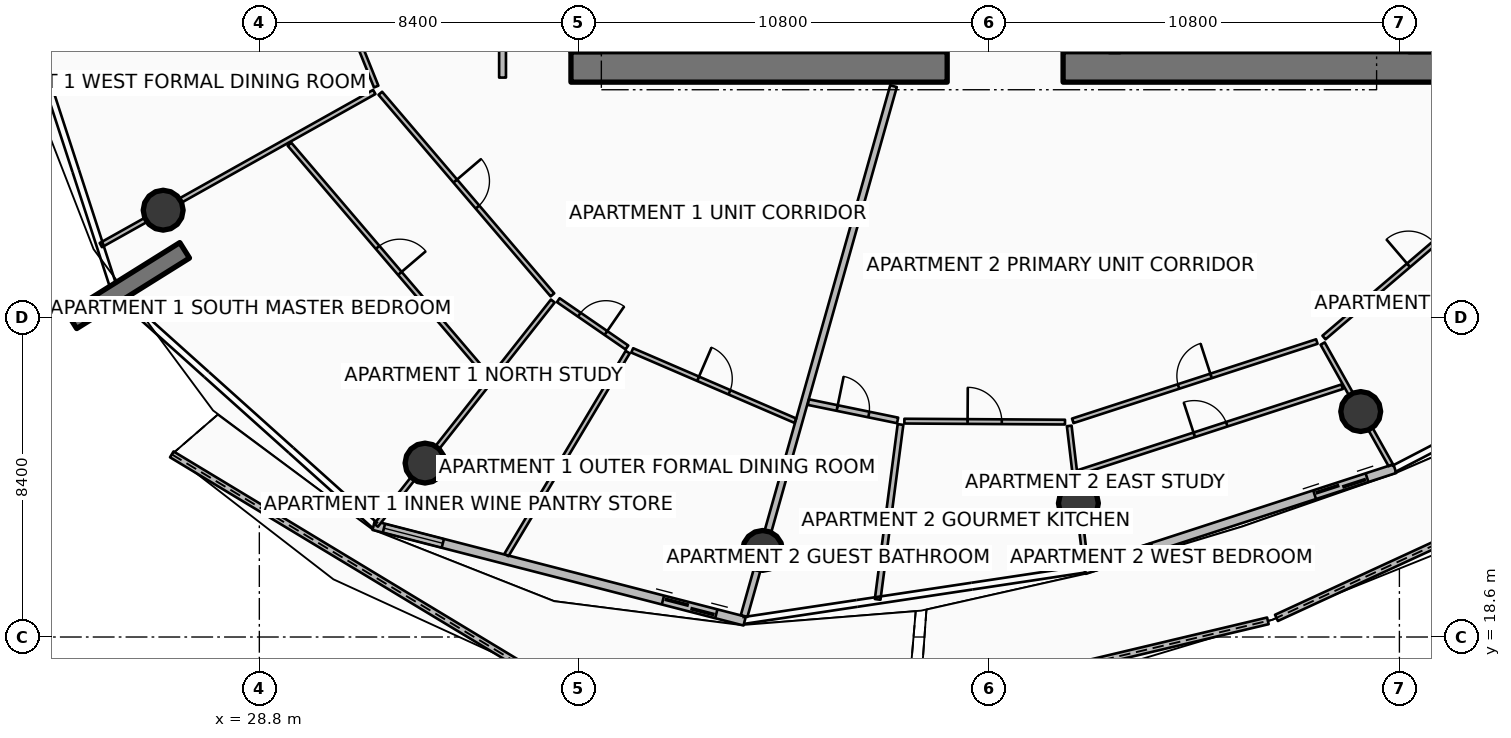
"""IFC4 building model, lengths in metres.
Left out: names, types, materials, properties, quantities, classifications, styles, units other than length and angle.
Written with IfcOpenShell. Run it as: python <this file> out.ifc"""

import sys

from ifc_helpers import new_model, si_unit, direction, frame, frame_2d, origin, origin_2d, place, context, subcontext, project, spatial, polyline, rectangle, circle, outline, extrude, element, fill, save


model = new_model("IFC4")
c1 = context("Model", 3, precision=1e-05, world=origin(), true_north=direction((0.0, 1.0)))
c2 = subcontext(c1, "Body", "Model", "MODEL_VIEW")
j1 = project(units=[si_unit("LENGTHUNIT", "METRE"), si_unit("PLANEANGLEUNIT", "RADIAN")], contexts=[c1])
p1 = place(None, origin())
s1 = spatial("IfcSite", under=j1, at=p1, CompositionType="ELEMENT")
p2 = place(p1, origin())
s2 = spatial("IfcBuilding", under=s1, at=p2, CompositionType="ELEMENT")
p3 = place(p2, frame((0.0, 0.0, 169.05)))
s3 = spatial("IfcBuildingStorey", under=s2, at=p3, CompositionType="ELEMENT", Elevation=169.05)
p4 = place(p3, frame((37.0, 33.6, 0.0), z_axis=(0.0, 0.0, 1.0), x_axis=(1.0, 0.0, 0.0)))
e1 = element("IfcWall", 1, at=p4, inside=s3, PredefinedType="SHEAR", context=c2, shape_type="SweptSolid", body=[
    extrude(rectangle(XDim=9.9, YDim=0.8, at=frame_2d((4.95, 0.0))), origin(), (0.0, 0.0, 1.0), 3.75),
])
p5 = place(p3, frame((49.95, 33.6, 0.0), z_axis=(0.0, 0.0, 1.0), x_axis=(1.0, 0.0, 0.0)))
e2 = element("IfcWall", 2, at=p5, inside=s3, PredefinedType="SHEAR", context=c2, shape_type="SweptSolid", body=[
    extrude(rectangle(XDim=9.9, YDim=0.8, at=frame_2d((4.95, 0.0))), origin(), (0.0, 0.0, 1.0), 3.75),
])
p6 = place(p3, frame((26.835, 28.774, 0.0), z_axis=(0.0, 0.0, 1.0), x_axis=(-0.848053161125, -0.529911158502, 0.0)))
e3 = element("IfcWall", 3, at=p6, inside=s3, PredefinedType="SOLIDWALL", context=c2, shape_type="SweptSolid", body=[
    extrude(rectangle(XDim=3.5, YDim=0.48, at=frame_2d((1.75, 0.0))), origin(), (0.0, 0.0, 1.0), 3.75),
])
for number, where, z_axis, x_axis in (
    (4, (26.27, 29.831, 0.0), (0.0, 0.0, 1.0), (1.0, 0.0, 0.0)),
    (5, (33.16, 23.176, 0.0), (0.0, 0.0, 1.0), (1.0, 0.0, 0.0)),
    (6, (42.043, 20.878, 0.0), (0.0, 0.0, 1.0), (1.0, 0.0, 0.0)),
    (7, (50.353, 22.119, 0.0), (0.0, 0.0, 1.0), (1.0, 0.0, 0.0)),
    (8, (57.782, 24.533, 0.0), (0.0, 0.0, 1.0), (1.0, 0.0, 0.0)),
):
    element("IfcColumn", number, at=place(p3, frame(where, z_axis=z_axis, x_axis=x_axis)), inside=s3, PredefinedType="COLUMN", context=c2, shape_type="SweptSolid", body=[
        extrude(circle(Radius=0.525, at=origin_2d()), origin(), (0.0, 0.0, 1.0), 3.5),
    ])
p7 = place(p3, frame((26.497, 23.406, 0.0), z_axis=(0.0, 0.0, 1.0), x_axis=(0.856001332464, -0.516973615207, 0.0)))
e9 = element("IfcWall", 9, at=p7, inside=s3, PredefinedType="PARAPET", context=c2, shape_type="SweptSolid", body=[
    extrude(outline(polyline([(0.0, 0.0), (10.626, 0.0), (10.626, 1.348), (5.313, 1.182), (0.0, 1.12), (0.0, 0.0)])), frame((0.0, 0.09, 0.0), z_axis=(0.0, -1.0, 0.0), x_axis=(1.0, 0.0, 0.0)), (0.0, 0.0, 1.0), 0.18),
])
p8 = place(p3, frame((46.175, 16.849, 0.0), z_axis=(0.0, 0.0, 1.0), x_axis=(0.972947039014, 0.231028265098, 0.0)))
e10 = element("IfcWall", 10, at=p8, inside=s3, PredefinedType="PARAPET", context=c2, shape_type="SweptSolid", body=[
    extrude(outline(polyline([(0.0, 0.0), (9.419, 0.0), (9.419, 1.832), (4.709, 1.853), (0.0, 1.756), (0.0, 0.0)])), frame((0.0, 0.09, 0.0), z_axis=(0.0, -1.0, 0.0), x_axis=(1.0, 0.0, 0.0)), (0.0, 0.0, 1.0), 0.18),
])
p9 = place(p3, frame((55.565, 19.103, 0.0), z_axis=(0.0, 0.0, 1.0), x_axis=(0.908087442579, 0.418780606799, 0.0)))
e11 = element("IfcWall", 11, at=p9, inside=s3, PredefinedType="PARAPET", context=c2, shape_type="SweptSolid", body=[
    extrude(outline(polyline([(0.0, 0.0), (9.315, 0.0), (9.315, 1.497), (4.658, 1.696), (0.0, 1.832), (0.0, 0.0)])), frame((0.0, 0.09, 0.0), z_axis=(0.0, -1.0, 0.0), x_axis=(1.0, 0.0, 0.0)), (0.0, 0.0, 1.0), 0.18),
])
p10 = place(p3, frame((31.808, 21.534, 0.0), z_axis=(0.0, 0.0, 1.0), x_axis=(0.968379685126, -0.249481032214, 0.0)))
e12 = element("IfcWall", 12, at=p10, inside=s3, PredefinedType="SOLIDWALL", context=c2, shape_type="SweptSolid", body=[
    extrude(rectangle(XDim=10.082, YDim=0.24, at=frame_2d((5.041, 0.0))), origin(), (0.0, 0.0, 1.0), 2.45),
])
p11 = place(p10, frame((7.862, 0.0, 0.0)))
e13 = element("IfcOpeningElement", 13, at=p11, cuts=e12, PredefinedType="OPENING", context=c2, shape_type="SweptSolid", body=[
    extrude(rectangle(XDim=1.45, YDim=2.15, at=frame_2d((0.725, 1.075))), frame((0.0, 0.13, 0.0), z_axis=(0.0, -1.0, 0.0), x_axis=(1.0, 0.0, 0.0)), (0.0, 0.0, 1.0), 0.26),
])
p12 = place(p10, frame((0.28, 0.0, 0.65)))
e14 = element("IfcOpeningElement", 14, at=p12, cuts=e12, PredefinedType="OPENING", context=c2, shape_type="SweptSolid", body=[
    extrude(rectangle(XDim=1.6, YDim=1.5, at=frame_2d((0.8, 0.75))), frame((0.0, 0.13, 0.0), z_axis=(0.0, -1.0, 0.0), x_axis=(1.0, 0.0, 0.0)), (0.0, 0.0, 1.0), 0.26),
])
p13 = place(p3, frame((50.51, 20.376, 0.0), z_axis=(0.0, 0.0, 1.0), x_axis=(0.951046390632, 0.309048156224, 0.0)))
e15 = element("IfcWall", 15, at=p13, inside=s3, PredefinedType="SOLIDWALL", context=c2, shape_type="SweptSolid", body=[
    extrude(rectangle(XDim=8.59, YDim=0.24, at=frame_2d((4.295, 0.0))), origin(), (0.0, 0.0, 1.0), 2.45),
])
p14 = place(p13, frame((6.37, 0.0, 0.0)))
e16 = element("IfcOpeningElement", 16, at=p14, cuts=e15, PredefinedType="OPENING", context=c2, shape_type="SweptSolid", body=[
    extrude(rectangle(XDim=1.45, YDim=2.15, at=frame_2d((0.725, 1.075))), frame((0.0, 0.13, 0.0), z_axis=(0.0, -1.0, 0.0), x_axis=(1.0, 0.0, 0.0)), (0.0, 0.0, 1.0), 0.26),
])
p15 = place(p13, frame((0.28, 0.0, 0.65)))
e17 = element("IfcOpeningElement", 17, at=p15, cuts=e15, PredefinedType="OPENING", context=c2, shape_type="SweptSolid", body=[
    extrude(rectangle(XDim=1.6, YDim=1.5, at=frame_2d((0.8, 0.75))), frame((0.0, 0.13, 0.0), z_axis=(0.0, -1.0, 0.0), x_axis=(1.0, 0.0, 0.0)), (0.0, 0.0, 1.0), 0.26),
])
p16 = place(p3, frame((45.488, 33.094, 0.0), z_axis=(0.0, 0.0, 1.0), x_axis=(-0.271442952208, -0.962454530717, 0.0)))
e18 = element("IfcWall", 18, at=p16, inside=s3, PredefinedType="PARTITIONING", context=c2, shape_type="SweptSolid", body=[
    extrude(rectangle(XDim=14.486, YDim=0.18, at=frame_2d((7.243, 0.0))), origin(), (0.0, 0.0, 1.0), 2.94),
])
p17 = place(p3, frame((30.185, 37.284, 0.0), z_axis=(0.0, 0.0, 1.0), x_axis=(0.373193309098, -0.927753606322, 0.0)))
e19 = element("IfcWall", 19, at=p17, inside=s3, PredefinedType="PARTITIONING", context=c2, shape_type="SweptSolid", body=[
    extrude(rectangle(XDim=4.528, YDim=0.125, at=frame_2d((2.264, 0.0))), origin(), (0.0, 0.0, 1.0), 2.94),
])
p18 = place(p17, frame((1.814, 0.0, 0.0)))
e20 = element("IfcOpeningElement", 20, at=p18, cuts=e19, PredefinedType="OPENING", context=c2, shape_type="SweptSolid", body=[
    extrude(rectangle(XDim=0.9, YDim=2.08, at=frame_2d((0.45, 1.04))), frame((0.0, 0.073, 0.0), z_axis=(0.0, -1.0, 0.0), x_axis=(1.0, 0.0, 0.0)), (0.0, 0.0, 1.0), 0.145),
])
p19 = place(p3, frame((35.2, 34.712, 0.0), z_axis=(0.0, 0.0, 1.0), x_axis=(0.0, -1.0, 0.0)))
e21 = element("IfcWall", 21, at=p19, inside=s3, PredefinedType="PARTITIONING", context=c2, shape_type="SweptSolid", body=[
    extrude(rectangle(XDim=1.392, YDim=0.18, at=frame_2d((0.696, 0.0))), origin(), (0.0, 0.0, 1.0), 2.94),
])
p20 = place(p3, frame((31.825, 32.941, 0.0), z_axis=(0.0, 0.0, 1.0), x_axis=(-0.872491881101, -0.488628608877, 0.0)))
e22 = element("IfcWall", 22, at=p20, inside=s3, PredefinedType="PARTITIONING", context=c2, shape_type="SweptSolid", body=[
    extrude(rectangle(XDim=8.247, YDim=0.125, at=frame_2d((4.124, 0.0))), origin(), (0.0, 0.0, 1.0), 2.94),
])
p21 = place(p3, frame((31.983, 32.907, 0.0), z_axis=(0.0, 0.0, 1.0), x_axis=(0.649447060425, -0.76040680935, 0.0)))
e23 = element("IfcWall", 23, at=p21, inside=s3, PredefinedType="PARTITIONING", context=c2, shape_type="SweptSolid", body=[
    extrude(rectangle(XDim=6.975, YDim=0.125, at=frame_2d((3.487, 0.0))), origin(), (0.0, 0.0, 1.0), 2.94),
])
p22 = place(p21, frame((3.037, 0.0, 0.0)))
e24 = element("IfcOpeningElement", 24, at=p22, cuts=e23, PredefinedType="OPENING", context=c2, shape_type="SweptSolid", body=[
    extrude(rectangle(XDim=0.9, YDim=2.08, at=frame_2d((0.45, 1.04))), frame((0.0, 0.073, 0.0), z_axis=(0.0, -1.0, 0.0), x_axis=(1.0, 0.0, 0.0)), (0.0, 0.0, 1.0), 0.145),
])
p23 = place(p3, frame((29.593, 31.568, 0.0), z_axis=(0.0, 0.0, 1.0), x_axis=(0.649460624158, -0.760395224649, 0.0)))
e25 = element("IfcWall", 25, at=p23, inside=s3, PredefinedType="PARTITIONING", context=c2, shape_type="SweptSolid", body=[
    extrude(rectangle(XDim=8.044, YDim=0.125, at=frame_2d((4.022, 0.0))), origin(), (0.0, 0.0, 1.0), 2.94),
])
p24 = place(p23, frame((3.572, 0.0, 0.0)))
e26 = element("IfcOpeningElement", 26, at=p24, cuts=e25, PredefinedType="OPENING", context=c2, shape_type="SweptSolid", body=[
    extrude(rectangle(XDim=0.9, YDim=2.08, at=frame_2d((0.45, 1.04))), frame((0.0, 0.073, 0.0), z_axis=(0.0, -1.0, 0.0), x_axis=(1.0, 0.0, 0.0)), (0.0, 0.0, 1.0), 0.145),
])
p25 = place(p3, frame((36.523, 27.441, 0.0), z_axis=(0.0, 0.0, 1.0), x_axis=(-0.619110986016, -0.785303499925, 0.0)))
e27 = element("IfcWall", 27, at=p25, inside=s3, PredefinedType="PARTITIONING", context=c2, shape_type="SweptSolid", body=[
    extrude(rectangle(XDim=7.513, YDim=0.125, at=frame_2d((3.756, 0.0))), origin(), (0.0, 0.0, 1.0), 2.94),
])
p26 = place(p3, frame((38.493, 26.096, 0.0), z_axis=(0.0, 0.0, 1.0), x_axis=(-0.513080671857, -0.858340389453, 0.0)))
e28 = element("IfcWall", 28, at=p26, inside=s3, PredefinedType="PARTITIONING", context=c2, shape_type="SweptSolid", body=[
    extrude(rectangle(XDim=6.219, YDim=0.125, at=frame_2d((3.11, 0.0))), origin(), (0.0, 0.0, 1.0), 2.94),
])
p27 = place(p3, frame((36.667, 27.463, 0.0), z_axis=(0.0, 0.0, 1.0), x_axis=(0.823476398479, -0.567350527582, 0.0)))
e29 = element("IfcWall", 29, at=p27, inside=s3, PredefinedType="PARTITIONING", context=c2, shape_type="SweptSolid", body=[
    extrude(rectangle(XDim=2.193, YDim=0.125, at=frame_2d((1.097, 0.0))), origin(), (0.0, 0.0, 1.0), 2.94),
])
p28 = place(p27, frame((0.672, 0.0, 0.0)))
e30 = element("IfcOpeningElement", 30, at=p28, cuts=e29, PredefinedType="OPENING", context=c2, shape_type="SweptSolid", body=[
    extrude(rectangle(XDim=0.85, YDim=2.06, at=frame_2d((0.425, 1.03))), frame((0.0, 0.073, 0.0), z_axis=(0.0, -1.0, 0.0), x_axis=(1.0, 0.0, 0.0)), (0.0, 0.0, 1.0), 0.145),
])
p29 = place(p3, frame((38.613, 26.142, 0.0), z_axis=(0.0, 0.0, 1.0), x_axis=(0.918381064076, -0.395697133105, 0.0)))
e31 = element("IfcWall", 31, at=p29, inside=s3, PredefinedType="PARTITIONING", context=c2, shape_type="SweptSolid", body=[
    extrude(rectangle(XDim=4.672, YDim=0.125, at=frame_2d((2.336, 0.0))), origin(), (0.0, 0.0, 1.0), 2.94),
])
p30 = place(p29, frame((1.886, 0.0, 0.0)))
e32 = element("IfcOpeningElement", 32, at=p30, cuts=e31, PredefinedType="OPENING", context=c2, shape_type="SweptSolid", body=[
    extrude(rectangle(XDim=0.9, YDim=2.08, at=frame_2d((0.45, 1.04))), frame((0.0, 0.073, 0.0), z_axis=(0.0, -1.0, 0.0), x_axis=(1.0, 0.0, 0.0)), (0.0, 0.0, 1.0), 0.145),
])
p31 = place(p3, frame((43.247, 24.781, 0.0), z_axis=(0.0, 0.0, 1.0), x_axis=(0.979581104341, -0.201049396961, 0.0)))
e33 = element("IfcWall", 33, at=p31, inside=s3, PredefinedType="PARTITIONING", context=c2, shape_type="SweptSolid", body=[
    extrude(rectangle(XDim=2.397, YDim=0.15, at=frame_2d((1.198, 0.0))), origin(), (0.0, 0.0, 1.0), 2.94),
])
p32 = place(p31, frame((0.773, 0.0, 0.0)))
e34 = element("IfcOpeningElement", 34, at=p32, cuts=e33, PredefinedType="OPENING", context=c2, shape_type="SweptSolid", body=[
    extrude(rectangle(XDim=0.85, YDim=2.06, at=frame_2d((0.425, 1.03))), frame((0.0, 0.085, 0.0), z_axis=(0.0, -1.0, 0.0), x_axis=(1.0, 0.0, 0.0)), (0.0, 0.0, 1.0), 0.17),
])
p33 = place(p3, frame((45.672, 24.192, 0.0), z_axis=(0.0, 0.0, 1.0), x_axis=(-0.129620296369, -0.991563703838, 0.0)))
e35 = element("IfcWall", 35, at=p33, inside=s3, PredefinedType="PARTITIONING", context=c2, shape_type="SweptSolid", body=[
    extrude(rectangle(XDim=4.641, YDim=0.15, at=frame_2d((2.32, 0.0))), origin(), (0.0, 0.0, 1.0), 2.94),
])
p34 = place(p3, frame((45.774, 24.28, 0.0), z_axis=(0.0, 0.0, 1.0), x_axis=(0.999981257614, -0.006122452106, 0.0)))
e36 = element("IfcWall", 36, at=p34, inside=s3, PredefinedType="PARTITIONING", context=c2, shape_type="SweptSolid", body=[
    extrude(rectangle(XDim=4.227, YDim=0.125, at=frame_2d((2.113, 0.0))), origin(), (0.0, 0.0, 1.0), 2.94),
])
p35 = place(p34, frame((1.663, 0.0, 0.0)))
e37 = element("IfcOpeningElement", 37, at=p35, cuts=e36, PredefinedType="OPENING", context=c2, shape_type="SweptSolid", body=[
    extrude(rectangle(XDim=0.9, YDim=2.08, at=frame_2d((0.45, 1.04))), frame((0.0, 0.073, 0.0), z_axis=(0.0, -1.0, 0.0), x_axis=(1.0, 0.0, 0.0)), (0.0, 0.0, 1.0), 0.145),
])
p36 = place(p3, frame((50.112, 24.155, 0.0), z_axis=(0.0, 0.0, 1.0), x_axis=(0.117510984651, -0.99307158276, 0.0)))
e38 = element("IfcWall", 38, at=p36, inside=s3, PredefinedType="PARTITIONING", context=c2, shape_type="SweptSolid", body=[
    extrude(rectangle(XDim=3.765, YDim=0.125, at=frame_2d((1.882, 0.0))), origin(), (0.0, 0.0, 1.0), 2.94),
])
p37 = place(p3, frame((50.205, 24.288, 0.0), z_axis=(0.0, 0.0, 1.0), x_axis=(0.951056650279, 0.309016582016, 0.0)))
e39 = element("IfcWall", 39, at=p37, inside=s3, PredefinedType="PARTITIONING", context=c2, shape_type="SweptSolid", body=[
    extrude(rectangle(XDim=6.753, YDim=0.125, at=frame_2d((3.376, 0.0))), origin(), (0.0, 0.0, 1.0), 2.94),
])
p38 = place(p37, frame((2.926, 0.0, 0.0)))
e40 = element("IfcOpeningElement", 40, at=p38, cuts=e39, PredefinedType="OPENING", context=c2, shape_type="SweptSolid", body=[
    extrude(rectangle(XDim=0.9, YDim=2.08, at=frame_2d((0.45, 1.04))), frame((0.0, 0.073, 0.0), z_axis=(0.0, -1.0, 0.0), x_axis=(1.0, 0.0, 0.0)), (0.0, 0.0, 1.0), 0.145),
])
p39 = place(p3, frame((50.365, 22.934, 0.0), z_axis=(0.0, 0.0, 1.0), x_axis=(0.951058941496, 0.309009530274, 0.0)))
e41 = element("IfcWall", 41, at=p39, inside=s3, PredefinedType="PARTITIONING", context=c2, shape_type="SweptSolid", body=[
    extrude(rectangle(XDim=7.284, YDim=0.125, at=frame_2d((3.642, 0.0))), origin(), (0.0, 0.0, 1.0), 2.94),
])
p40 = place(p39, frame((3.192, 0.0, 0.0)))
e42 = element("IfcOpeningElement", 42, at=p40, cuts=e41, PredefinedType="OPENING", context=c2, shape_type="SweptSolid", body=[
    extrude(rectangle(XDim=0.9, YDim=2.08, at=frame_2d((0.45, 1.04))), frame((0.0, 0.073, 0.0), z_axis=(0.0, -1.0, 0.0), x_axis=(1.0, 0.0, 0.0)), (0.0, 0.0, 1.0), 0.145),
])
p41 = place(p3, frame((56.781, 26.321, 0.0), z_axis=(0.0, 0.0, 1.0), x_axis=(0.488615541235, -0.872499199348, 0.0)))
e43 = element("IfcWall", 43, at=p41, inside=s3, PredefinedType="PARTITIONING", context=c2, shape_type="SweptSolid", body=[
    extrude(rectangle(XDim=3.665, YDim=0.125, at=frame_2d((1.832, 0.0))), origin(), (0.0, 0.0, 1.0), 2.94),
])
p42 = place(p3, frame((56.815, 26.48, 0.0), z_axis=(0.0, 0.0, 1.0), x_axis=(0.760406411553, 0.649447526186, 0.0)))
e44 = element("IfcWall", 44, at=p42, inside=s3, PredefinedType="PARTITIONING", context=c2, shape_type="SweptSolid", body=[
    extrude(rectangle(XDim=6.753, YDim=0.125, at=frame_2d((3.376, 0.0))), origin(), (0.0, 0.0, 1.0), 2.94),
])
p43 = place(p42, frame((2.926, 0.0, 0.0)))
e45 = element("IfcOpeningElement", 45, at=p43, cuts=e44, PredefinedType="OPENING", context=c2, shape_type="SweptSolid", body=[
    extrude(rectangle(XDim=0.9, YDim=2.08, at=frame_2d((0.45, 1.04))), frame((0.0, 0.073, 0.0), z_axis=(0.0, -1.0, 0.0), x_axis=(1.0, 0.0, 0.0)), (0.0, 0.0, 1.0), 0.145),
])
p44 = place(p11, origin())
e46 = element("IfcDoor", 46, at=p44, inside=s3, OperationType="DOUBLE_DOOR_SLIDING", PredefinedType="DOOR", context=c2, shape_type="SweptSolid", body=[
    extrude(rectangle(XDim=1.45, YDim=2.15, at=frame_2d((0.725, 1.075))), frame((0.0, 0.025, 0.0), z_axis=(0.0, -1.0, 0.0), x_axis=(1.0, 0.0, 0.0)), (0.0, 0.0, 1.0), 0.05),
])
fill(e13, e46)
p45 = place(p12, origin())
e47 = element("IfcWindow", 47, at=p45, inside=s3, PartitioningType="SINGLE_PANEL", PredefinedType="WINDOW", context=c2, shape_type="SweptSolid", body=[
    extrude(rectangle(XDim=1.6, YDim=1.5, at=frame_2d((0.8, 0.75))), frame((0.0, 0.03, 0.0), z_axis=(0.0, -1.0, 0.0), x_axis=(1.0, 0.0, 0.0)), (0.0, 0.0, 1.0), 0.06),
])
fill(e14, e47)
p46 = place(p14, origin())
e48 = element("IfcDoor", 48, at=p46, inside=s3, OperationType="DOUBLE_DOOR_SLIDING", PredefinedType="DOOR", context=c2, shape_type="SweptSolid", body=[
    extrude(rectangle(XDim=1.45, YDim=2.15, at=frame_2d((0.725, 1.075))), frame((0.0, 0.025, 0.0), z_axis=(0.0, -1.0, 0.0), x_axis=(1.0, 0.0, 0.0)), (0.0, 0.0, 1.0), 0.05),
])
fill(e16, e48)
p47 = place(p15, origin())
e49 = element("IfcWindow", 49, at=p47, inside=s3, PartitioningType="SINGLE_PANEL", PredefinedType="WINDOW", context=c2, shape_type="SweptSolid", body=[
    extrude(rectangle(XDim=1.6, YDim=1.5, at=frame_2d((0.8, 0.75))), frame((0.0, 0.03, 0.0), z_axis=(0.0, -1.0, 0.0), x_axis=(1.0, 0.0, 0.0)), (0.0, 0.0, 1.0), 0.06),
])
fill(e17, e49)
p48 = place(p22, origin())
e50 = element("IfcDoor", 50, at=p48, inside=s3, OperationType="SINGLE_SWING_LEFT", PredefinedType="DOOR", context=c2, shape_type="SweptSolid", body=[
    extrude(rectangle(XDim=0.9, YDim=2.08, at=frame_2d((0.45, 1.04))), frame((0.0, 0.025, 0.0), z_axis=(0.0, -1.0, 0.0), x_axis=(1.0, 0.0, 0.0)), (0.0, 0.0, 1.0), 0.05),
])
fill(e24, e50)
p49 = place(p24, origin())
e51 = element("IfcDoor", 51, at=p49, inside=s3, OperationType="SINGLE_SWING_RIGHT", PredefinedType="DOOR", context=c2, shape_type="SweptSolid", body=[
    extrude(rectangle(XDim=0.9, YDim=2.08, at=frame_2d((0.45, 1.04))), frame((0.0, 0.025, 0.0), z_axis=(0.0, -1.0, 0.0), x_axis=(1.0, 0.0, 0.0)), (0.0, 0.0, 1.0), 0.05),
])
fill(e26, e51)
p50 = place(p28, origin())
e52 = element("IfcDoor", 52, at=p50, inside=s3, OperationType="SINGLE_SWING_RIGHT", PredefinedType="DOOR", context=c2, shape_type="SweptSolid", body=[
    extrude(rectangle(XDim=0.85, YDim=2.06, at=frame_2d((0.425, 1.03))), frame((0.0, 0.025, 0.0), z_axis=(0.0, -1.0, 0.0), x_axis=(1.0, 0.0, 0.0)), (0.0, 0.0, 1.0), 0.05),
])
fill(e30, e52)
p51 = place(p30, origin())
e53 = element("IfcDoor", 53, at=p51, inside=s3, OperationType="SINGLE_SWING_LEFT", PredefinedType="DOOR", context=c2, shape_type="SweptSolid", body=[
    extrude(rectangle(XDim=0.9, YDim=2.08, at=frame_2d((0.45, 1.04))), frame((0.0, 0.025, 0.0), z_axis=(0.0, -1.0, 0.0), x_axis=(1.0, 0.0, 0.0)), (0.0, 0.0, 1.0), 0.05),
])
fill(e32, e53)
p52 = place(p32, origin())
e54 = element("IfcDoor", 54, at=p52, inside=s3, OperationType="SINGLE_SWING_LEFT", PredefinedType="DOOR", context=c2, shape_type="SweptSolid", body=[
    extrude(rectangle(XDim=0.85, YDim=2.06, at=frame_2d((0.425, 1.03))), frame((0.0, 0.025, 0.0), z_axis=(0.0, -1.0, 0.0), x_axis=(1.0, 0.0, 0.0)), (0.0, 0.0, 1.0), 0.05),
])
fill(e34, e54)
p53 = place(p35, origin())
e55 = element("IfcDoor", 55, at=p53, inside=s3, OperationType="SINGLE_SWING_LEFT", PredefinedType="DOOR", context=c2, shape_type="SweptSolid", body=[
    extrude(rectangle(XDim=0.9, YDim=2.08, at=frame_2d((0.45, 1.04))), frame((0.0, 0.025, 0.0), z_axis=(0.0, -1.0, 0.0), x_axis=(1.0, 0.0, 0.0)), (0.0, 0.0, 1.0), 0.05),
])
fill(e37, e55)
p54 = place(p38, origin())
e56 = element("IfcDoor", 56, at=p54, inside=s3, OperationType="SINGLE_SWING_RIGHT", PredefinedType="DOOR", context=c2, shape_type="SweptSolid", body=[
    extrude(rectangle(XDim=0.9, YDim=2.08, at=frame_2d((0.45, 1.04))), frame((0.0, 0.025, 0.0), z_axis=(0.0, -1.0, 0.0), x_axis=(1.0, 0.0, 0.0)), (0.0, 0.0, 1.0), 0.05),
])
fill(e40, e56)
p55 = place(p40, origin())
e57 = element("IfcDoor", 57, at=p55, inside=s3, OperationType="SINGLE_SWING_LEFT", PredefinedType="DOOR", context=c2, shape_type="SweptSolid", body=[
    extrude(rectangle(XDim=0.9, YDim=2.08, at=frame_2d((0.45, 1.04))), frame((0.0, 0.025, 0.0), z_axis=(0.0, -1.0, 0.0), x_axis=(1.0, 0.0, 0.0)), (0.0, 0.0, 1.0), 0.05),
])
fill(e42, e57)
p56 = place(p43, origin())
e58 = element("IfcDoor", 58, at=p56, inside=s3, OperationType="SINGLE_SWING_LEFT", PredefinedType="DOOR", context=c2, shape_type="SweptSolid", body=[
    extrude(rectangle(XDim=0.9, YDim=2.08, at=frame_2d((0.45, 1.04))), frame((0.0, 0.025, 0.0), z_axis=(0.0, -1.0, 0.0), x_axis=(1.0, 0.0, 0.0)), (0.0, 0.0, 1.0), 0.05),
])
fill(e45, e58)
save(model, sys.argv[1])
